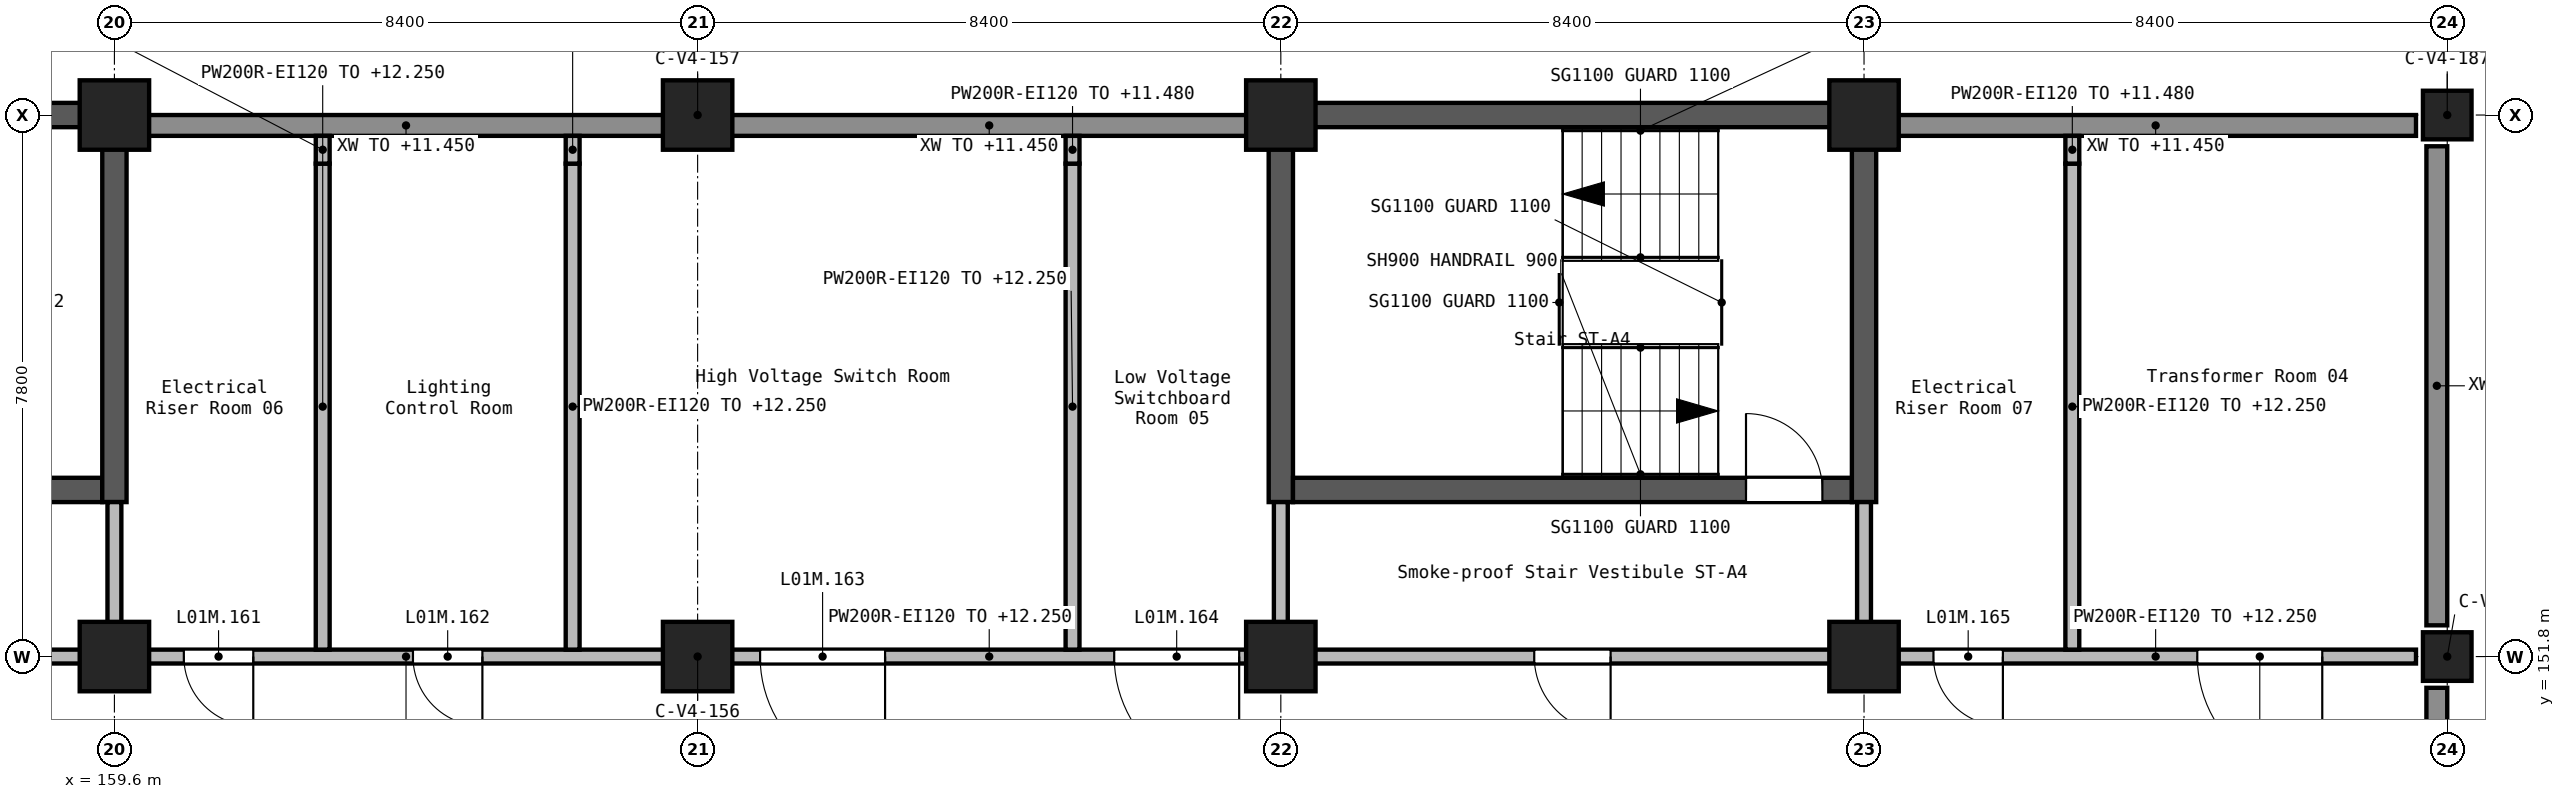
"""IFC4 building model, lengths in metres.
Left out: names, types, materials, properties, quantities, classifications, styles, units other than length and angle.
Written with IfcOpenShell. Run it as: python <this file> out.ifc"""

import sys

from ifc_helpers import new_model, si_unit, direction, frame, frame_2d, origin, origin_2d, place, context, subcontext, project, spatial, rectangle, extrude, element, fill, save


model = new_model("IFC4")
c1 = context("Model", 3, precision=1e-05, world=origin(), true_north=direction((0.0, 1.0)))
c2 = subcontext(c1, "Body", "Model", "MODEL_VIEW")
j1 = project(units=[si_unit("LENGTHUNIT", "METRE"), si_unit("PLANEANGLEUNIT", "RADIAN")], contexts=[c1])
p1 = place(None, origin())
s1 = spatial("IfcSite", under=j1, at=p1, CompositionType="ELEMENT")
p2 = place(p1, origin())
s2 = spatial("IfcBuilding", under=s1, at=p2, CompositionType="ELEMENT")
p3 = place(p2, frame((0.0, 0.0, 9.9)))
s3 = spatial("IfcBuildingStorey", under=s2, at=p3, CompositionType="ELEMENT", Elevation=9.9)
for number, where, z_axis, x_axis in (
    (1, (159.6, 151.8, 0.0), (0.0, 0.0, 1.0), (1.0, 0.0, 0.0)),
    (2, (159.6, 159.6, 0.0), (0.0, 0.0, 1.0), (1.0, 0.0, 0.0)),
    (3, (168.0, 151.8, 0.0), (0.0, 0.0, 1.0), (1.0, 0.0, 0.0)),
    (4, (168.0, 159.6, 0.0), (0.0, 0.0, 1.0), (1.0, 0.0, 0.0)),
    (5, (176.4, 151.8, 0.0), (0.0, 0.0, 1.0), (1.0, 0.0, 0.0)),
    (6, (176.4, 159.6, 0.0), (0.0, 0.0, 1.0), (1.0, 0.0, 0.0)),
    (7, (184.8, 151.8, 0.0), (0.0, 0.0, 1.0), (1.0, 0.0, 0.0)),
    (8, (184.8, 159.6, 0.0), (0.0, 0.0, 1.0), (1.0, 0.0, 0.0)),
):
    element("IfcColumn", number, at=place(p3, frame(where, z_axis=z_axis, x_axis=x_axis)), inside=s3, PredefinedType="COLUMN", context=c2, shape_type="SweptSolid", body=[
        extrude(rectangle(XDim=1.0, YDim=1.0, at=origin_2d()), origin(), (0.0, 0.0, 1.0), 2.7),
    ])
for number, where, z_axis, x_axis in (
    (9, (193.2, 151.8, 0.0), (0.0, 0.0, 1.0), (1.0, 0.0, 0.0)),
    (10, (193.2, 159.6, 0.0), (0.0, 0.0, 1.0), (1.0, 0.0, 0.0)),
):
    element("IfcColumn", number, at=place(p3, frame(where, z_axis=z_axis, x_axis=x_axis)), inside=s3, PredefinedType="COLUMN", context=c2, shape_type="SweptSolid", body=[
        extrude(rectangle(XDim=0.7, YDim=0.7, at=origin_2d()), origin(), (0.0, 0.0, 1.0), 2.7),
    ])
p4 = place(p3, frame((155.4, 154.2, 0.0), z_axis=(0.0, 0.0, 1.0), x_axis=(1.0, 0.0, 0.0)))
e11 = element("IfcWall", 11, at=p4, inside=s3, PredefinedType="SHEAR", context=c2, shape_type="SweptSolid", body=[
    extrude(rectangle(XDim=4.025, YDim=0.35, at=frame_2d((2.013, 0.0))), origin(), (0.0, 0.0, 1.0), 2.7),
])
p5 = place(p4, frame((1.55, 0.0, 0.0)))
e12 = element("IfcOpeningElement", 12, at=p5, cuts=e11, PredefinedType="OPENING", context=c2, shape_type="SweptSolid", body=[
    extrude(rectangle(XDim=1.1, YDim=2.1, at=frame_2d((0.55, 1.05))), frame((0.0, 0.185, 0.0), z_axis=(0.0, -1.0, 0.0), x_axis=(1.0, 0.0, 0.0)), (0.0, 0.0, 1.0), 0.37),
])
p6 = place(p3, frame((155.4, 159.6, 0.0), z_axis=(0.0, 0.0, 1.0), x_axis=(1.0, 0.0, 0.0)))
e13 = element("IfcWall", 13, at=p6, inside=s3, PredefinedType="SHEAR", context=c2, shape_type="SweptSolid", body=[
    extrude(rectangle(XDim=4.025, YDim=0.35, at=frame_2d((2.013, 0.0))), origin(), (0.0, 0.0, 1.0), 2.7),
])
p7 = place(p3, frame((159.6, 154.025, 0.0), z_axis=(0.0, 0.0, 1.0), x_axis=(0.0, 1.0, 0.0)))
e14 = element("IfcWall", 14, at=p7, inside=s3, PredefinedType="SHEAR", context=c2, shape_type="SweptSolid", body=[
    extrude(rectangle(XDim=5.75, YDim=0.35, at=frame_2d((2.875, 0.0))), origin(), (0.0, 0.0, 1.0), 2.7),
])
p8 = place(p3, frame((176.225, 159.6, 0.0), z_axis=(0.0, 0.0, 1.0), x_axis=(1.0, 0.0, 0.0)))
e15 = element("IfcWall", 15, at=p8, inside=s3, PredefinedType="SHEAR", context=c2, shape_type="SweptSolid", body=[
    extrude(rectangle(XDim=8.4, YDim=0.35, at=frame_2d((4.2, 0.0))), origin(), (0.0, 0.0, 1.0), 2.7),
])
p9 = place(p3, frame((176.4, 154.025, 0.0), z_axis=(0.0, 0.0, 1.0), x_axis=(0.0, 1.0, 0.0)))
e16 = element("IfcWall", 16, at=p9, inside=s3, PredefinedType="SHEAR", context=c2, shape_type="SweptSolid", body=[
    extrude(rectangle(XDim=5.4, YDim=0.35, at=frame_2d((2.7, 0.0))), origin(), (0.0, 0.0, 1.0), 2.7),
])
p10 = place(p3, frame((176.575, 154.2, 0.0), z_axis=(0.0, 0.0, 1.0), x_axis=(1.0, 0.0, 0.0)))
e17 = element("IfcWall", 17, at=p10, inside=s3, PredefinedType="SHEAR", context=c2, shape_type="SweptSolid", body=[
    extrude(rectangle(XDim=8.05, YDim=0.35, at=frame_2d((4.025, 0.0))), origin(), (0.0, 0.0, 1.0), 2.7),
])
p11 = place(p10, frame((6.525, 0.0, 0.0)))
e18 = element("IfcOpeningElement", 18, at=p11, cuts=e17, PredefinedType="OPENING", context=c2, shape_type="SweptSolid", body=[
    extrude(rectangle(XDim=1.1, YDim=2.1, at=frame_2d((0.55, 1.05))), frame((0.0, 0.185, 0.0), z_axis=(0.0, -1.0, 0.0), x_axis=(1.0, 0.0, 0.0)), (0.0, 0.0, 1.0), 0.37),
])
p12 = place(p3, frame((184.8, 154.025, 0.0), z_axis=(0.0, 0.0, 1.0), x_axis=(0.0, 1.0, 0.0)))
e19 = element("IfcWall", 19, at=p12, inside=s3, PredefinedType="SHEAR", context=c2, shape_type="SweptSolid", body=[
    extrude(rectangle(XDim=5.75, YDim=0.35, at=frame_2d((2.875, 0.0))), origin(), (0.0, 0.0, 1.0), 2.7),
])
p13 = place(p3, frame((193.05, 148.65, 0.0), z_axis=(0.0, 0.0, 1.0), x_axis=(0.0, 1.0, 0.0)))
e20 = element("IfcWall", 20, at=p13, inside=s3, PredefinedType="STANDARD", context=c2, shape_type="SweptSolid", body=[
    extrude(rectangle(XDim=2.7, YDim=0.3, at=frame_2d((1.35, 0.0))), origin(), (0.0, 0.0, 1.0), 1.55),
])
p14 = place(p3, frame((193.05, 152.25, 0.0), z_axis=(0.0, 0.0, 1.0), x_axis=(0.0, 1.0, 0.0)))
e21 = element("IfcWall", 21, at=p14, inside=s3, PredefinedType="STANDARD", context=c2, shape_type="SweptSolid", body=[
    extrude(rectangle(XDim=6.9, YDim=0.3, at=frame_2d((3.45, 0.0))), origin(), (0.0, 0.0, 1.0), 1.55),
])
for number, where, z_axis, x_axis in (
    (22, (192.75, 159.45, 0.0), (0.0, 0.0, 1.0), (-1.0, 0.0, 0.0)),
    (23, (175.95, 159.45, 0.0), (0.0, 0.0, 1.0), (-1.0, 0.0, 0.0)),
    (24, (167.55, 159.45, 0.0), (0.0, 0.0, 1.0), (-1.0, 0.0, 0.0)),
):
    element("IfcWall", number, at=place(p3, frame(where, z_axis=z_axis, x_axis=x_axis)), inside=s3, PredefinedType="STANDARD", context=c2, shape_type="SweptSolid", body=[
        extrude(rectangle(XDim=7.5, YDim=0.3, at=frame_2d((3.75, 0.0))), origin(), (0.0, 0.0, 1.0), 1.55),
    ])
p15 = place(p3, frame((192.75, 151.8, 0.0), z_axis=(0.0, 0.0, 1.0), x_axis=(-1.0, 0.0, 0.0)))
e25 = element("IfcWall", 25, at=p15, inside=s3, PredefinedType="SOLIDWALL", context=c2, shape_type="SweptSolid", body=[
    extrude(rectangle(XDim=7.5, YDim=0.2, at=frame_2d((3.75, 0.0))), origin(), (0.0, 0.0, 1.0), 2.35),
])
p16 = place(p15, frame((5.95, 0.0, 0.0)))
e26 = element("IfcOpeningElement", 26, at=p16, cuts=e25, PredefinedType="OPENING", context=c2, shape_type="SweptSolid", body=[
    extrude(rectangle(XDim=1.0, YDim=2.1, at=frame_2d((0.5, 1.05))), frame((0.0, 0.11, 0.0), z_axis=(0.0, -1.0, 0.0), x_axis=(1.0, 0.0, 0.0)), (0.0, 0.0, 1.0), 0.22),
])
p17 = place(p15, frame((1.35, 0.0, 0.0)))
e27 = element("IfcOpeningElement", 27, at=p17, cuts=e25, PredefinedType="OPENING", context=c2, shape_type="SweptSolid", body=[
    extrude(rectangle(XDim=1.8, YDim=2.1, at=frame_2d((0.9, 1.05))), frame((0.0, 0.11, 0.0), z_axis=(0.0, -1.0, 0.0), x_axis=(1.0, 0.0, 0.0)), (0.0, 0.0, 1.0), 0.22),
])
p18 = place(p3, frame((184.35, 151.8, 0.0), z_axis=(0.0, 0.0, 1.0), x_axis=(-1.0, 0.0, 0.0)))
e28 = element("IfcWall", 28, at=p18, inside=s3, PredefinedType="SOLIDWALL", context=c2, shape_type="SweptSolid", body=[
    extrude(rectangle(XDim=7.5, YDim=0.2, at=frame_2d((3.75, 0.0))), origin(), (0.0, 0.0, 1.0), 2.35),
])
p19 = place(p18, frame((3.2, 0.0, 0.0)))
e29 = element("IfcOpeningElement", 29, at=p19, cuts=e28, PredefinedType="OPENING", context=c2, shape_type="SweptSolid", body=[
    extrude(rectangle(XDim=1.1, YDim=2.1, at=frame_2d((0.55, 1.05))), frame((0.0, 0.11, 0.0), z_axis=(0.0, -1.0, 0.0), x_axis=(1.0, 0.0, 0.0)), (0.0, 0.0, 1.0), 0.22),
])
p20 = place(p3, frame((175.95, 151.8, 0.0), z_axis=(0.0, 0.0, 1.0), x_axis=(-1.0, 0.0, 0.0)))
e30 = element("IfcWall", 30, at=p20, inside=s3, PredefinedType="SOLIDWALL", context=c2, shape_type="SweptSolid", body=[
    extrude(rectangle(XDim=7.5, YDim=0.2, at=frame_2d((3.75, 0.0))), origin(), (0.0, 0.0, 1.0), 2.35),
])
p21 = place(p20, frame((5.25, 0.0, 0.0)))
e31 = element("IfcOpeningElement", 31, at=p21, cuts=e30, PredefinedType="OPENING", context=c2, shape_type="SweptSolid", body=[
    extrude(rectangle(XDim=1.8, YDim=2.1, at=frame_2d((0.9, 1.05))), frame((0.0, 0.11, 0.0), z_axis=(0.0, -1.0, 0.0), x_axis=(1.0, 0.0, 0.0)), (0.0, 0.0, 1.0), 0.22),
])
p22 = place(p20, frame((0.15, 0.0, 0.0)))
e32 = element("IfcOpeningElement", 32, at=p22, cuts=e30, PredefinedType="OPENING", context=c2, shape_type="SweptSolid", body=[
    extrude(rectangle(XDim=1.8, YDim=2.1, at=frame_2d((0.9, 1.05))), frame((0.0, 0.11, 0.0), z_axis=(0.0, -1.0, 0.0), x_axis=(1.0, 0.0, 0.0)), (0.0, 0.0, 1.0), 0.22),
])
p23 = place(p3, frame((167.55, 151.8, 0.0), z_axis=(0.0, 0.0, 1.0), x_axis=(-1.0, 0.0, 0.0)))
e33 = element("IfcWall", 33, at=p23, inside=s3, PredefinedType="SOLIDWALL", context=c2, shape_type="SweptSolid", body=[
    extrude(rectangle(XDim=7.5, YDim=0.2, at=frame_2d((3.75, 0.0))), origin(), (0.0, 0.0, 1.0), 2.35),
])
p24 = place(p23, frame((5.95, 0.0, 0.0)))
e34 = element("IfcOpeningElement", 34, at=p24, cuts=e33, PredefinedType="OPENING", context=c2, shape_type="SweptSolid", body=[
    extrude(rectangle(XDim=1.0, YDim=2.1, at=frame_2d((0.5, 1.05))), frame((0.0, 0.11, 0.0), z_axis=(0.0, -1.0, 0.0), x_axis=(1.0, 0.0, 0.0)), (0.0, 0.0, 1.0), 0.22),
])
p25 = place(p23, frame((2.65, 0.0, 0.0)))
e35 = element("IfcOpeningElement", 35, at=p25, cuts=e33, PredefinedType="OPENING", context=c2, shape_type="SweptSolid", body=[
    extrude(rectangle(XDim=1.0, YDim=2.1, at=frame_2d((0.5, 1.05))), frame((0.0, 0.11, 0.0), z_axis=(0.0, -1.0, 0.0), x_axis=(1.0, 0.0, 0.0)), (0.0, 0.0, 1.0), 0.22),
])
p26 = place(p3, frame((159.15, 151.8, 0.0), z_axis=(0.0, 0.0, 1.0), x_axis=(-1.0, 0.0, 0.0)))
e36 = element("IfcWall", 36, at=p26, inside=s3, PredefinedType="SOLIDWALL", context=c2, shape_type="SweptSolid", body=[
    extrude(rectangle(XDim=7.5, YDim=0.2, at=frame_2d((3.75, 0.0))), origin(), (0.0, 0.0, 1.0), 2.35),
])
p27 = place(p26, frame((2.85, 0.0, 0.0)))
e37 = element("IfcOpeningElement", 37, at=p27, cuts=e36, PredefinedType="OPENING", context=c2, shape_type="SweptSolid", body=[
    extrude(rectangle(XDim=1.8, YDim=2.1, at=frame_2d((0.9, 1.05))), frame((0.0, 0.11, 0.0), z_axis=(0.0, -1.0, 0.0), x_axis=(1.0, 0.0, 0.0)), (0.0, 0.0, 1.0), 0.22),
])
for number, where, z_axis, x_axis in (
    (38, (159.6, 152.25, 0.0), (0.0, 0.0, 1.0), (0.0, 1.0, 0.0)),
    (39, (176.4, 152.25, 0.0), (0.0, 0.0, 1.0), (0.0, 1.0, 0.0)),
    (40, (184.8, 152.25, 0.0), (0.0, 0.0, 1.0), (0.0, 1.0, 0.0)),
):
    element("IfcWall", number, at=place(p3, frame(where, z_axis=z_axis, x_axis=x_axis)), inside=s3, PredefinedType="SOLIDWALL", context=c2, shape_type="SweptSolid", body=[
        extrude(rectangle(XDim=1.775, YDim=0.2, at=frame_2d((0.887, 0.0))), origin(), (0.0, 0.0, 1.0), 2.35),
    ])
p28 = place(p3, frame((162.6, 151.9, 0.0), z_axis=(0.0, 0.0, 1.0), x_axis=(0.0, 1.0, 0.0)))
e41 = element("IfcWall", 41, at=p28, inside=s3, PredefinedType="SOLIDWALL", context=c2, shape_type="SweptSolid", body=[
    extrude(rectangle(XDim=7.0, YDim=0.2, at=frame_2d((3.5, 0.0))), origin(), (0.0, 0.0, 1.0), 2.35),
])
p29 = place(p3, frame((162.6, 158.9, 0.0), z_axis=(0.0, 0.0, 1.0), x_axis=(0.0, 1.0, 0.0)))
e42 = element("IfcWall", 42, at=p29, inside=s3, PredefinedType="SOLIDWALL", context=c2, shape_type="SweptSolid", body=[
    extrude(rectangle(XDim=0.4, YDim=0.2, at=frame_2d((0.2, 0.0))), origin(), (0.0, 0.0, 1.0), 1.58),
])
p30 = place(p3, frame((166.2, 151.9, 0.0), z_axis=(0.0, 0.0, 1.0), x_axis=(0.0, 1.0, 0.0)))
e43 = element("IfcWall", 43, at=p30, inside=s3, PredefinedType="SOLIDWALL", context=c2, shape_type="SweptSolid", body=[
    extrude(rectangle(XDim=7.0, YDim=0.2, at=frame_2d((3.5, 0.0))), origin(), (0.0, 0.0, 1.0), 2.35),
])
p31 = place(p3, frame((166.2, 158.9, 0.0), z_axis=(0.0, 0.0, 1.0), x_axis=(0.0, 1.0, 0.0)))
e44 = element("IfcWall", 44, at=p31, inside=s3, PredefinedType="SOLIDWALL", context=c2, shape_type="SweptSolid", body=[
    extrude(rectangle(XDim=0.4, YDim=0.2, at=frame_2d((0.2, 0.0))), origin(), (0.0, 0.0, 1.0), 1.58),
])
p32 = place(p3, frame((173.4, 151.9, 0.0), z_axis=(0.0, 0.0, 1.0), x_axis=(0.0, 1.0, 0.0)))
e45 = element("IfcWall", 45, at=p32, inside=s3, PredefinedType="SOLIDWALL", context=c2, shape_type="SweptSolid", body=[
    extrude(rectangle(XDim=7.0, YDim=0.2, at=frame_2d((3.5, 0.0))), origin(), (0.0, 0.0, 1.0), 2.35),
])
p33 = place(p3, frame((173.4, 158.9, 0.0), z_axis=(0.0, 0.0, 1.0), x_axis=(0.0, 1.0, 0.0)))
e46 = element("IfcWall", 46, at=p33, inside=s3, PredefinedType="SOLIDWALL", context=c2, shape_type="SweptSolid", body=[
    extrude(rectangle(XDim=0.4, YDim=0.2, at=frame_2d((0.2, 0.0))), origin(), (0.0, 0.0, 1.0), 1.58),
])
p34 = place(p3, frame((187.8, 151.9, 0.0), z_axis=(0.0, 0.0, 1.0), x_axis=(0.0, 1.0, 0.0)))
e47 = element("IfcWall", 47, at=p34, inside=s3, PredefinedType="SOLIDWALL", context=c2, shape_type="SweptSolid", body=[
    extrude(rectangle(XDim=7.0, YDim=0.2, at=frame_2d((3.5, 0.0))), origin(), (0.0, 0.0, 1.0), 2.35),
])
p35 = place(p3, frame((187.8, 158.9, 0.0), z_axis=(0.0, 0.0, 1.0), x_axis=(0.0, 1.0, 0.0)))
e48 = element("IfcWall", 48, at=p35, inside=s3, PredefinedType="SOLIDWALL", context=c2, shape_type="SweptSolid", body=[
    extrude(rectangle(XDim=0.4, YDim=0.2, at=frame_2d((0.2, 0.0))), origin(), (0.0, 0.0, 1.0), 1.58),
])
p36 = place(p11, origin())
e49 = element("IfcDoor", 49, at=p36, inside=s3, OperationType="SINGLE_SWING_RIGHT", PredefinedType="DOOR", context=c2, shape_type="SweptSolid", body=[
    extrude(rectangle(XDim=1.1, YDim=2.1, at=frame_2d((0.55, 1.05))), frame((0.0, 0.025, 0.0), z_axis=(0.0, -1.0, 0.0), x_axis=(1.0, 0.0, 0.0)), (0.0, 0.0, 1.0), 0.05),
])
fill(e18, e49)
p37 = place(p19, frame((1.1, 0.0, 0.0), z_axis=(0.0, 0.0, 1.0), x_axis=(-1.0, 0.0, 0.0)))
e50 = element("IfcDoor", 50, at=p37, inside=s3, OperationType="SINGLE_SWING_RIGHT", PredefinedType="DOOR", context=c2, shape_type="SweptSolid", body=[
    extrude(rectangle(XDim=1.1, YDim=2.1, at=frame_2d((0.55, 1.05))), frame((0.0, 0.025, 0.0), z_axis=(0.0, -1.0, 0.0), x_axis=(1.0, 0.0, 0.0)), (0.0, 0.0, 1.0), 0.05),
])
fill(e29, e50)
p38 = place(p24, frame((1.0, 0.0, 0.0), z_axis=(0.0, 0.0, 1.0), x_axis=(-1.0, 0.0, 0.0)))
e51 = element("IfcDoor", 51, at=p38, inside=s3, OperationType="SINGLE_SWING_LEFT", PredefinedType="DOOR", context=c2, shape_type="SweptSolid", body=[
    extrude(rectangle(XDim=1.0, YDim=2.1, at=frame_2d((0.5, 1.05))), frame((0.0, 0.025, 0.0), z_axis=(0.0, -1.0, 0.0), x_axis=(1.0, 0.0, 0.0)), (0.0, 0.0, 1.0), 0.05),
])
fill(e34, e51)
p39 = place(p25, frame((1.0, 0.0, 0.0), z_axis=(0.0, 0.0, 1.0), x_axis=(-1.0, 0.0, 0.0)))
e52 = element("IfcDoor", 52, at=p39, inside=s3, OperationType="SINGLE_SWING_RIGHT", PredefinedType="DOOR", context=c2, shape_type="SweptSolid", body=[
    extrude(rectangle(XDim=1.0, YDim=2.1, at=frame_2d((0.5, 1.05))), frame((0.0, 0.025, 0.0), z_axis=(0.0, -1.0, 0.0), x_axis=(1.0, 0.0, 0.0)), (0.0, 0.0, 1.0), 0.05),
])
fill(e35, e52)
p40 = place(p21, frame((1.8, 0.0, 0.0), z_axis=(0.0, 0.0, 1.0), x_axis=(-1.0, 0.0, 0.0)))
e53 = element("IfcDoor", 53, at=p40, inside=s3, OperationType="DOUBLE_DOOR_SINGLE_SWING", PredefinedType="DOOR", context=c2, shape_type="SweptSolid", body=[
    extrude(rectangle(XDim=1.8, YDim=2.1, at=frame_2d((0.9, 1.05))), frame((0.0, 0.025, 0.0), z_axis=(0.0, -1.0, 0.0), x_axis=(1.0, 0.0, 0.0)), (0.0, 0.0, 1.0), 0.05),
])
fill(e31, e53)
p41 = place(p22, frame((1.8, 0.0, 0.0), z_axis=(0.0, 0.0, 1.0), x_axis=(-1.0, 0.0, 0.0)))
e54 = element("IfcDoor", 54, at=p41, inside=s3, OperationType="DOUBLE_DOOR_SINGLE_SWING", PredefinedType="DOOR", context=c2, shape_type="SweptSolid", body=[
    extrude(rectangle(XDim=1.8, YDim=2.1, at=frame_2d((0.9, 1.05))), frame((0.0, 0.025, 0.0), z_axis=(0.0, -1.0, 0.0), x_axis=(1.0, 0.0, 0.0)), (0.0, 0.0, 1.0), 0.05),
])
fill(e32, e54)
p42 = place(p16, frame((1.0, 0.0, 0.0), z_axis=(0.0, 0.0, 1.0), x_axis=(-1.0, 0.0, 0.0)))
e55 = element("IfcDoor", 55, at=p42, inside=s3, OperationType="SINGLE_SWING_LEFT", PredefinedType="DOOR", context=c2, shape_type="SweptSolid", body=[
    extrude(rectangle(XDim=1.0, YDim=2.1, at=frame_2d((0.5, 1.05))), frame((0.0, 0.025, 0.0), z_axis=(0.0, -1.0, 0.0), x_axis=(1.0, 0.0, 0.0)), (0.0, 0.0, 1.0), 0.05),
])
fill(e26, e55)
p43 = place(p17, frame((1.8, 0.0, 0.0), z_axis=(0.0, 0.0, 1.0), x_axis=(-1.0, 0.0, 0.0)))
e56 = element("IfcDoor", 56, at=p43, inside=s3, OperationType="DOUBLE_DOOR_SINGLE_SWING", PredefinedType="DOOR", context=c2, shape_type="SweptSolid", body=[
    extrude(rectangle(XDim=1.8, YDim=2.1, at=frame_2d((0.9, 1.05))), frame((0.0, 0.025, 0.0), z_axis=(0.0, -1.0, 0.0), x_axis=(1.0, 0.0, 0.0)), (0.0, 0.0, 1.0), 0.05),
])
fill(e27, e56)
save(model, sys.argv[1])
